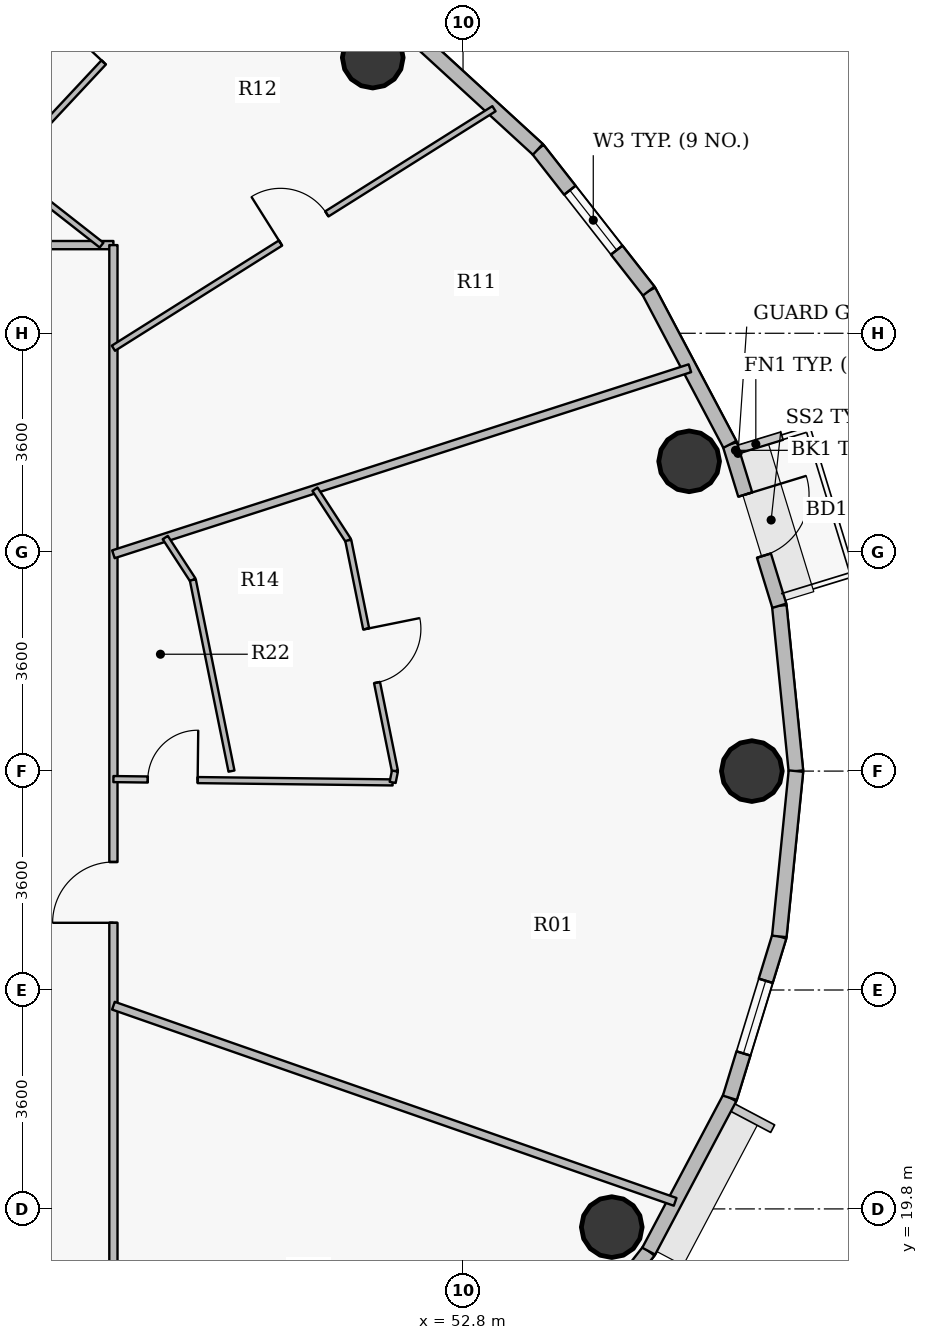
"""IFC4 building model, lengths in metres.
Left out: names, types, materials, properties, quantities, classifications, styles, units other than length and angle.
Written with IfcOpenShell. Run it as: python <this file> out.ifc"""

import sys

from ifc_helpers import new_model, si_unit, direction, frame, frame_2d, origin, origin_2d, place, context, subcontext, project, spatial, rectangle, hollow_circle, extrude, source, transform, mapped, element, fill, save


model = new_model("IFC4")
c1 = context("Model", 3, precision=1e-05, world=origin(), true_north=direction((0.0, 1.0)))
c2 = subcontext(c1, "Body", "Model", "MODEL_VIEW")
j1 = project(units=[si_unit("LENGTHUNIT", "METRE"), si_unit("PLANEANGLEUNIT", "RADIAN")], contexts=[c1])
p1 = place(None, origin())
s1 = spatial("IfcSite", under=j1, at=p1, CompositionType="ELEMENT")
p2 = place(p1, origin())
s2 = spatial("IfcBuilding", under=s1, at=p2, CompositionType="ELEMENT")
p3 = place(p2, frame((0.0, 0.0, 295.5)))
s3 = spatial("IfcBuildingStorey", under=s2, at=p3, CompositionType="ELEMENT", Elevation=295.5)
for number, where, z_axis, x_axis in (
    (1, (57.55, 27.0, 0.0), (0.0, 0.0, 1.0), (1.0, 0.0, 0.0)),
    (2, (56.519, 32.094, 0.0), (0.0, 0.0, 1.0), (1.0, 0.0, 0.0)),
    (3, (51.315, 38.733, 0.0), (0.0, 0.0, 1.0), (1.0, 0.0, 0.0)),
    (4, (55.246, 19.5, 0.0), (0.0, 0.0, 1.0), (1.0, 0.0, 0.0)),
):
    element("IfcColumn", number, at=place(p3, frame(where, z_axis=z_axis, x_axis=x_axis)), inside=s3, PredefinedType="COLUMN", context=c2, shape_type="SweptSolid", body=[
        extrude(hollow_circle(Radius=0.5, WallThickness=0.032, at=origin_2d()), origin(), (0.0, 0.0, 1.0), 3.75),
    ])
p4 = place(p3, frame((58.002, 29.719, 0.0), z_axis=(0.0, 0.0, 1.0), x_axis=(0.099972526841, -0.99499019788, 0.0)))
e5 = element("IfcWall", 5, at=p4, inside=s3, PredefinedType="SOLIDWALL", context=c2, shape_type="SweptSolid", body=[
    extrude(rectangle(XDim=2.733, YDim=0.24, at=frame_2d((1.366, 0.0))), origin(), (0.0, 0.0, 1.0), 3.5),
])
p5 = place(p3, frame((57.188, 32.372, 0.0), z_axis=(0.0, 0.0, 1.0), x_axis=(0.2931213403, -0.956075248012, 0.0)))
e6 = element("IfcWall", 6, at=p5, inside=s3, PredefinedType="SOLIDWALL", context=c2, shape_type="SweptSolid", body=[
    extrude(rectangle(XDim=2.775, YDim=0.24, at=frame_2d((1.388, 0.0))), origin(), (0.0, 0.0, 1.0), 3.5),
])
p6 = place(p5, frame((0.863, 0.0, 0.0)))
e7 = element("IfcOpeningElement", 7, at=p6, cuts=e6, PredefinedType="OPENING", context=c2, shape_type="SweptSolid", body=[
    extrude(rectangle(XDim=1.05, YDim=2.15, at=origin_2d()), frame((0.525, 0.13, 1.075), z_axis=(0.0, -1.0, 0.0), x_axis=(1.0, 0.0, 0.0)), (0.0, 0.0, 1.0), 0.26),
])
p7 = place(p3, frame((55.854, 34.895, 0.0), z_axis=(0.0, 0.0, 1.0), x_axis=(0.467628269026, -0.883925224218, 0.0)))
e8 = element("IfcWall", 8, at=p7, inside=s3, PredefinedType="SOLIDWALL", context=c2, shape_type="SweptSolid", body=[
    extrude(rectangle(XDim=2.854, YDim=0.24, at=frame_2d((1.427, 0.0))), origin(), (0.0, 0.0, 1.0), 3.5),
])
p8 = place(p3, frame((54.03, 37.225, 0.0), z_axis=(0.0, 0.0, 1.0), x_axis=(0.616337186556, -0.787482363275, 0.0)))
e9 = element("IfcWall", 9, at=p8, inside=s3, PredefinedType="SOLIDWALL", context=c2, shape_type="SweptSolid", body=[
    extrude(rectangle(XDim=2.958, YDim=0.24, at=frame_2d((1.479, 0.0))), origin(), (0.0, 0.0, 1.0), 3.5),
])
p9 = place(p8, frame((0.854, 0.0, 0.9)))
e10 = element("IfcOpeningElement", 10, at=p9, cuts=e9, PredefinedType="OPENING", context=c2, shape_type="SweptSolid", body=[
    extrude(rectangle(XDim=1.25, YDim=1.65, at=origin_2d()), frame((0.625, 0.13, 0.825), z_axis=(0.0, -1.0, 0.0), x_axis=(1.0, 0.0, 0.0)), (0.0, 0.0, 1.0), 0.26),
])
p10 = place(p3, frame((51.762, 39.304, 0.0), z_axis=(0.0, 0.0, 1.0), x_axis=(0.737068506972, -0.675818034703, 0.0)))
e11 = element("IfcWall", 11, at=p10, inside=s3, PredefinedType="SOLIDWALL", context=c2, shape_type="SweptSolid", body=[
    extrude(rectangle(XDim=3.077, YDim=0.24, at=frame_2d((1.539, 0.0))), origin(), (0.0, 0.0, 1.0), 3.5),
])
p11 = place(p3, frame((55.854, 19.105, 0.0), z_axis=(0.0, 0.0, 1.0), x_axis=(-0.616337186556, -0.787482363275, 0.0)))
e12 = element("IfcWall", 12, at=p11, inside=s3, PredefinedType="SOLIDWALL", context=c2, shape_type="SweptSolid", body=[
    extrude(rectangle(XDim=2.958, YDim=0.24, at=frame_2d((1.479, 0.0))), origin(), (0.0, 0.0, 1.0), 3.5),
])
p12 = place(p11, frame((0.854, 0.0, 0.9)))
e13 = element("IfcOpeningElement", 13, at=p12, cuts=e12, PredefinedType="OPENING", context=c2, shape_type="SweptSolid", body=[
    extrude(rectangle(XDim=1.25, YDim=1.65, at=origin_2d()), frame((0.625, 0.13, 0.825), z_axis=(0.0, -1.0, 0.0), x_axis=(1.0, 0.0, 0.0)), (0.0, 0.0, 1.0), 0.26),
])
p13 = place(p3, frame((57.188, 21.628, 0.0), z_axis=(0.0, 0.0, 1.0), x_axis=(-0.467628269026, -0.883925224218, 0.0)))
e14 = element("IfcWall", 14, at=p13, inside=s3, PredefinedType="SOLIDWALL", context=c2, shape_type="SweptSolid", body=[
    extrude(rectangle(XDim=2.854, YDim=0.24, at=frame_2d((1.427, 0.0))), origin(), (0.0, 0.0, 1.0), 3.5),
])
p14 = place(p3, frame((58.002, 24.281, 0.0), z_axis=(0.0, 0.0, 1.0), x_axis=(-0.2931213403, -0.956075248012, 0.0)))
e15 = element("IfcWall", 15, at=p14, inside=s3, PredefinedType="SOLIDWALL", context=c2, shape_type="SweptSolid", body=[
    extrude(rectangle(XDim=2.775, YDim=0.24, at=frame_2d((1.388, 0.0))), origin(), (0.0, 0.0, 1.0), 3.5),
])
p15 = place(p14, frame((0.763, 0.0, 0.9)))
e16 = element("IfcOpeningElement", 16, at=p15, cuts=e15, PredefinedType="OPENING", context=c2, shape_type="SweptSolid", body=[
    extrude(rectangle(XDim=1.25, YDim=1.65, at=origin_2d()), frame((0.625, 0.13, 0.825), z_axis=(0.0, -1.0, 0.0), x_axis=(1.0, 0.0, 0.0)), (0.0, 0.0, 1.0), 0.26),
])
p16 = place(p3, frame((58.275, 27.0, 0.0), z_axis=(0.0, 0.0, 1.0), x_axis=(-0.099972526841, -0.99499019788, 0.0)))
e17 = element("IfcWall", 17, at=p16, inside=s3, PredefinedType="SOLIDWALL", context=c2, shape_type="SweptSolid", body=[
    extrude(rectangle(XDim=2.733, YDim=0.24, at=frame_2d((1.366, 0.0))), origin(), (0.0, 0.0, 1.0), 3.5),
])
p17 = place(p3, frame((36.95, 35.65, 0.0), z_axis=(0.0, 0.0, 1.0), x_axis=(1.0, 0.0, 0.0)))
e18 = element("IfcWall", 18, at=p17, inside=s3, PredefinedType="PARTITIONING", context=c2, shape_type="SweptSolid", body=[
    extrude(rectangle(XDim=10.1, YDim=0.135, at=frame_2d((5.05, 0.0))), origin(), (0.0, 0.0, 1.0), 3.035),
])
p18 = place(p17, frame((6.477, 0.0, 0.0)))
e19 = element("IfcOpeningElement", 19, at=p18, cuts=e18, PredefinedType="OPENING", context=c2, shape_type="SweptSolid", body=[
    extrude(rectangle(XDim=1.0, YDim=2.15, at=origin_2d()), frame((0.5, 0.078, 1.075), z_axis=(0.0, -1.0, 0.0), x_axis=(1.0, 0.0, 0.0)), (0.0, 0.0, 1.0), 0.155),
])
p19 = place(p3, frame((45.254, 36.904, 0.0), z_axis=(0.0, 0.0, 1.0), x_axis=(0.787350433025, -0.616505714179, 0.0)))
e20 = element("IfcWall", 20, at=p19, inside=s3, PredefinedType="PARTITIONING", context=c2, shape_type="SweptSolid", body=[
    extrude(rectangle(XDim=2.033, YDim=0.1, at=frame_2d((1.017, 0.0))), origin(), (0.0, 0.0, 1.0), 3.5),
])
p20 = place(p3, frame((45.254, 36.904, 0.0), z_axis=(0.0, 0.0, 1.0), x_axis=(0.682727638106, 0.73067295842, 0.0)))
e21 = element("IfcWall", 21, at=p20, inside=s3, PredefinedType="PARTITIONING", context=c2, shape_type="SweptSolid", body=[
    extrude(rectangle(XDim=5.693, YDim=0.1, at=frame_2d((2.846, 0.0))), origin(), (0.0, 0.0, 1.0), 2.985),
])
p21 = place(p20, frame((2.396, 0.0, 0.0)))
e22 = element("IfcOpeningElement", 22, at=p21, cuts=e21, PredefinedType="OPENING", context=c2, shape_type="SweptSolid", body=[
    extrude(rectangle(XDim=0.9, YDim=2.1, at=origin_2d()), frame((0.45, 0.06, 1.05), z_axis=(0.0, -1.0, 0.0), x_axis=(1.0, 0.0, 0.0)), (0.0, 0.0, 1.0), 0.12),
])
p22 = place(p3, frame((47.05, 18.35, 0.0), z_axis=(0.0, 0.0, 1.0), x_axis=(0.0, 1.0, 0.0)))
e23 = element("IfcWall", 23, at=p22, inside=s3, PredefinedType="PARTITIONING", context=c2, shape_type="SweptSolid", body=[
    extrude(rectangle(XDim=17.3, YDim=0.135, at=frame_2d((8.65, 0.0))), origin(), (0.0, 0.0, 1.0), 3.035),
])
p23 = place(p22, frame((6.155, 0.0, 0.0)))
e24 = element("IfcOpeningElement", 24, at=p23, cuts=e23, PredefinedType="OPENING", context=c2, shape_type="SweptSolid", body=[
    extrude(rectangle(XDim=1.0, YDim=2.15, at=origin_2d()), frame((0.5, 0.078, 1.075), z_axis=(0.0, -1.0, 0.0), x_axis=(1.0, 0.0, 0.0)), (0.0, 0.0, 1.0), 0.155),
])
p24 = place(p3, frame((47.05, 23.142, 0.0), z_axis=(0.0, 0.0, 1.0), x_axis=(0.94410974345, -0.329631297547, 0.0)))
e25 = element("IfcWall", 25, at=p24, inside=s3, PredefinedType="PARTITIONING", context=c2, shape_type="SweptSolid", body=[
    extrude(rectangle(XDim=9.785, YDim=0.135, at=frame_2d((4.893, 0.0))), origin(), (0.0, 0.0, 1.0), 2.985),
])
p25 = place(p3, frame((47.05, 26.869, 0.0), z_axis=(0.0, 0.0, 1.0), x_axis=(0.999929100649, -0.011907714968, 0.0)))
e26 = element("IfcWall", 26, at=p25, inside=s3, PredefinedType="PARTITIONING", context=c2, shape_type="SweptSolid", body=[
    extrude(rectangle(XDim=4.593, YDim=0.1, at=frame_2d((2.296, 0.0))), origin(), (0.0, 0.0, 1.0), 3.035),
])
p26 = place(p25, frame((0.565, 0.0, 0.0)))
e27 = element("IfcOpeningElement", 27, at=p26, cuts=e26, PredefinedType="OPENING", context=c2, shape_type="SweptSolid", body=[
    extrude(rectangle(XDim=0.82, YDim=2.1, at=origin_2d()), frame((0.41, 0.06, 1.05), z_axis=(0.0, -1.0, 0.0), x_axis=(1.0, 0.0, 0.0)), (0.0, 0.0, 1.0), 0.12),
])
p27 = place(p3, frame((47.05, 30.565, 0.0), z_axis=(0.0, 0.0, 1.0), x_axis=(0.951682976888, 0.307082255269, 0.0)))
e28 = element("IfcWall", 28, at=p27, inside=s3, PredefinedType="PARTITIONING", context=c2, shape_type="SweptSolid", body=[
    extrude(rectangle(XDim=9.963, YDim=0.135, at=frame_2d((4.981, 0.0))), origin(), (0.0, 0.0, 1.0), 2.985),
])
p28 = place(p3, frame((47.05, 33.954, 0.0), z_axis=(0.0, 0.0, 1.0), x_axis=(0.846339777122, 0.532643390704, 0.0)))
e29 = element("IfcWall", 29, at=p28, inside=s3, PredefinedType="PARTITIONING", context=c2, shape_type="SweptSolid", body=[
    extrude(rectangle(XDim=7.395, YDim=0.1, at=frame_2d((3.698, 0.0))), origin(), (0.0, 0.0, 1.0), 2.985),
])
p29 = place(p28, frame((3.248, 0.0, 0.0)))
e30 = element("IfcOpeningElement", 30, at=p29, cuts=e29, PredefinedType="OPENING", context=c2, shape_type="SweptSolid", body=[
    extrude(rectangle(XDim=0.9, YDim=2.1, at=origin_2d()), frame((0.45, 0.06, 1.05), z_axis=(0.0, -1.0, 0.0), x_axis=(1.0, 0.0, 0.0)), (0.0, 0.0, 1.0), 0.12),
])
p30 = place(p3, frame((47.903, 30.841, 0.0), z_axis=(0.0, 0.0, 1.0), x_axis=(0.545586849168, -0.838054288227, 0.0)))
e31 = element("IfcWall", 31, at=p30, inside=s3, PredefinedType="PARTITIONING", context=c2, shape_type="SweptSolid", body=[
    extrude(rectangle(XDim=0.832, YDim=0.1, at=frame_2d((0.416, 0.0))), origin(), (0.0, 0.0, 1.0), 3.035),
])
p31 = place(p3, frame((48.356, 30.144, 0.0), z_axis=(0.0, 0.0, 1.0), x_axis=(0.198208908342, -0.98015979751, 0.0)))
e32 = element("IfcWall", 32, at=p31, inside=s3, PredefinedType="PARTITIONING", context=c2, shape_type="SweptSolid", body=[
    extrude(rectangle(XDim=3.208, YDim=0.1, at=frame_2d((1.604, 0.0))), origin(), (0.0, 0.0, 1.0), 3.035),
])
p32 = place(p3, frame((50.365, 31.635, 0.0), z_axis=(0.0, 0.0, 1.0), x_axis=(0.545458599095, -0.83813776712, 0.0)))
e33 = element("IfcWall", 33, at=p32, inside=s3, PredefinedType="PARTITIONING", context=c2, shape_type="SweptSolid", body=[
    extrude(rectangle(XDim=1.003, YDim=0.1, at=frame_2d((0.502, 0.0))), origin(), (0.0, 0.0, 1.0), 3.035),
])
p33 = place(p3, frame((50.913, 30.794, 0.0), z_axis=(0.0, 0.0, 1.0), x_axis=(0.198226068862, -0.980156327135, 0.0)))
e34 = element("IfcWall", 34, at=p33, inside=s3, PredefinedType="PARTITIONING", context=c2, shape_type="SweptSolid", body=[
    extrude(rectangle(XDim=3.871, YDim=0.1, at=frame_2d((1.936, 0.0))), origin(), (0.0, 0.0, 1.0), 3.035),
])
p34 = place(p33, frame((1.486, 0.0, 0.0)))
e35 = element("IfcOpeningElement", 35, at=p34, cuts=e34, PredefinedType="OPENING", context=c2, shape_type="SweptSolid", body=[
    extrude(rectangle(XDim=0.9, YDim=2.1, at=origin_2d()), frame((0.45, 0.06, 1.05), z_axis=(0.0, -1.0, 0.0), x_axis=(1.0, 0.0, 0.0)), (0.0, 0.0, 1.0), 0.12),
])
p35 = place(p3, frame((51.642, 26.814, 0.0), z_axis=(0.0, 0.0, 1.0), x_axis=(0.198094703821, 0.980182885138, 0.0)))
e36 = element("IfcWall", 36, at=p35, inside=s3, PredefinedType="PARTITIONING", context=c2, shape_type="SweptSolid", body=[
    extrude(rectangle(XDim=0.19, YDim=0.1, at=frame_2d((0.095, 0.0))), origin(), (0.0, 0.0, 1.0), 3.035),
])
m1 = source(origin(), c2, "Body", "SweptSolid", [
    extrude(rectangle(XDim=1.05, YDim=2.15, at=origin_2d()), frame((0.525, 0.025, 1.075), z_axis=(0.0, -1.0, 0.0), x_axis=(1.0, 0.0, 0.0)), (0.0, 0.0, 1.0), 0.05),
])
p36 = place(p6, origin())
e37 = element("IfcDoor", 37, at=p36, inside=s3, OperationType="SINGLE_SWING_LEFT", PredefinedType="DOOR", context=c2, shape_type="MappedRepresentation", body=[
    mapped(m1, transform((0.0, 0.0, 0.0), x_axis=(1.0, 0.0, 0.0), y_axis=(0.0, 1.0, 0.0), z_axis=(0.0, 0.0, 1.0), scale=1.0)),
])
fill(e7, e37)
m2 = source(origin(), c2, "Body", "SweptSolid", [
    extrude(rectangle(XDim=1.25, YDim=1.65, at=origin_2d()), frame((0.625, 0.03, 0.825), z_axis=(0.0, -1.0, 0.0), x_axis=(1.0, 0.0, 0.0)), (0.0, 0.0, 1.0), 0.06),
])
p37 = place(p9, origin())
e38 = element("IfcWindow", 38, at=p37, inside=s3, PartitioningType="SINGLE_PANEL", PredefinedType="WINDOW", context=c2, shape_type="MappedRepresentation", body=[
    mapped(m2, transform((0.0, 0.0, 0.0), x_axis=(1.0, 0.0, 0.0), y_axis=(0.0, 1.0, 0.0), z_axis=(0.0, 0.0, 1.0), scale=1.0)),
])
fill(e10, e38)
p38 = place(p15, origin())
e39 = element("IfcWindow", 39, at=p38, inside=s3, PartitioningType="SINGLE_PANEL", PredefinedType="WINDOW", context=c2, shape_type="MappedRepresentation", body=[
    mapped(m2, transform((0.0, 0.0, 0.0), x_axis=(1.0, 0.0, 0.0), y_axis=(0.0, 1.0, 0.0), z_axis=(0.0, 0.0, 1.0), scale=1.0)),
])
fill(e16, e39)
m3 = source(origin(), c2, "Body", "SweptSolid", [
    extrude(rectangle(XDim=1.0, YDim=2.15, at=origin_2d()), frame((0.5, 0.025, 1.075), z_axis=(0.0, -1.0, 0.0), x_axis=(1.0, 0.0, 0.0)), (0.0, 0.0, 1.0), 0.05),
])
p39 = place(p23, origin())
e40 = element("IfcDoor", 40, at=p39, inside=s3, OperationType="SINGLE_SWING_LEFT", PredefinedType="DOOR", context=c2, shape_type="MappedRepresentation", body=[
    mapped(m3, transform((0.0, 0.0, 0.0), x_axis=(1.0, 0.0, 0.0), y_axis=(0.0, 1.0, 0.0), z_axis=(0.0, 0.0, 1.0), scale=1.0)),
])
fill(e24, e40)
m4 = source(origin(), c2, "Body", "SweptSolid", [
    extrude(rectangle(XDim=0.82, YDim=2.1, at=origin_2d()), frame((0.41, 0.025, 1.05), z_axis=(0.0, -1.0, 0.0), x_axis=(1.0, 0.0, 0.0)), (0.0, 0.0, 1.0), 0.05),
])
p40 = place(p26, origin())
e41 = element("IfcDoor", 41, at=p40, inside=s3, OperationType="SINGLE_SWING_RIGHT", PredefinedType="DOOR", context=c2, shape_type="MappedRepresentation", body=[
    mapped(m4, transform((0.0, 0.0, 0.0), x_axis=(1.0, 0.0, 0.0), y_axis=(0.0, 1.0, 0.0), z_axis=(0.0, 0.0, 1.0), scale=1.0)),
])
fill(e27, e41)
m5 = source(origin(), c2, "Body", "SweptSolid", [
    extrude(rectangle(XDim=0.9, YDim=2.1, at=origin_2d()), frame((0.45, 0.025, 1.05), z_axis=(0.0, -1.0, 0.0), x_axis=(1.0, 0.0, 0.0)), (0.0, 0.0, 1.0), 0.05),
])
p41 = place(p34, origin())
e42 = element("IfcDoor", 42, at=p41, inside=s3, OperationType="SINGLE_SWING_LEFT", PredefinedType="DOOR", context=c2, shape_type="MappedRepresentation", body=[
    mapped(m5, transform((0.0, 0.0, 0.0), x_axis=(1.0, 0.0, 0.0), y_axis=(0.0, 1.0, 0.0), z_axis=(0.0, 0.0, 1.0), scale=1.0)),
])
fill(e35, e42)
p42 = place(p21, origin())
e43 = element("IfcDoor", 43, at=p42, inside=s3, OperationType="SINGLE_SWING_LEFT", PredefinedType="DOOR", context=c2, shape_type="MappedRepresentation", body=[
    mapped(m5, transform((0.0, 0.0, 0.0), x_axis=(1.0, 0.0, 0.0), y_axis=(0.0, 1.0, 0.0), z_axis=(0.0, 0.0, 1.0), scale=1.0)),
])
fill(e22, e43)
p43 = place(p29, origin())
e44 = element("IfcDoor", 44, at=p43, inside=s3, OperationType="SINGLE_SWING_LEFT", PredefinedType="DOOR", context=c2, shape_type="MappedRepresentation", body=[
    mapped(m5, transform((0.0, 0.0, 0.0), x_axis=(1.0, 0.0, 0.0), y_axis=(0.0, 1.0, 0.0), z_axis=(0.0, 0.0, 1.0), scale=1.0)),
])
fill(e30, e44)
save(model, sys.argv[1])
